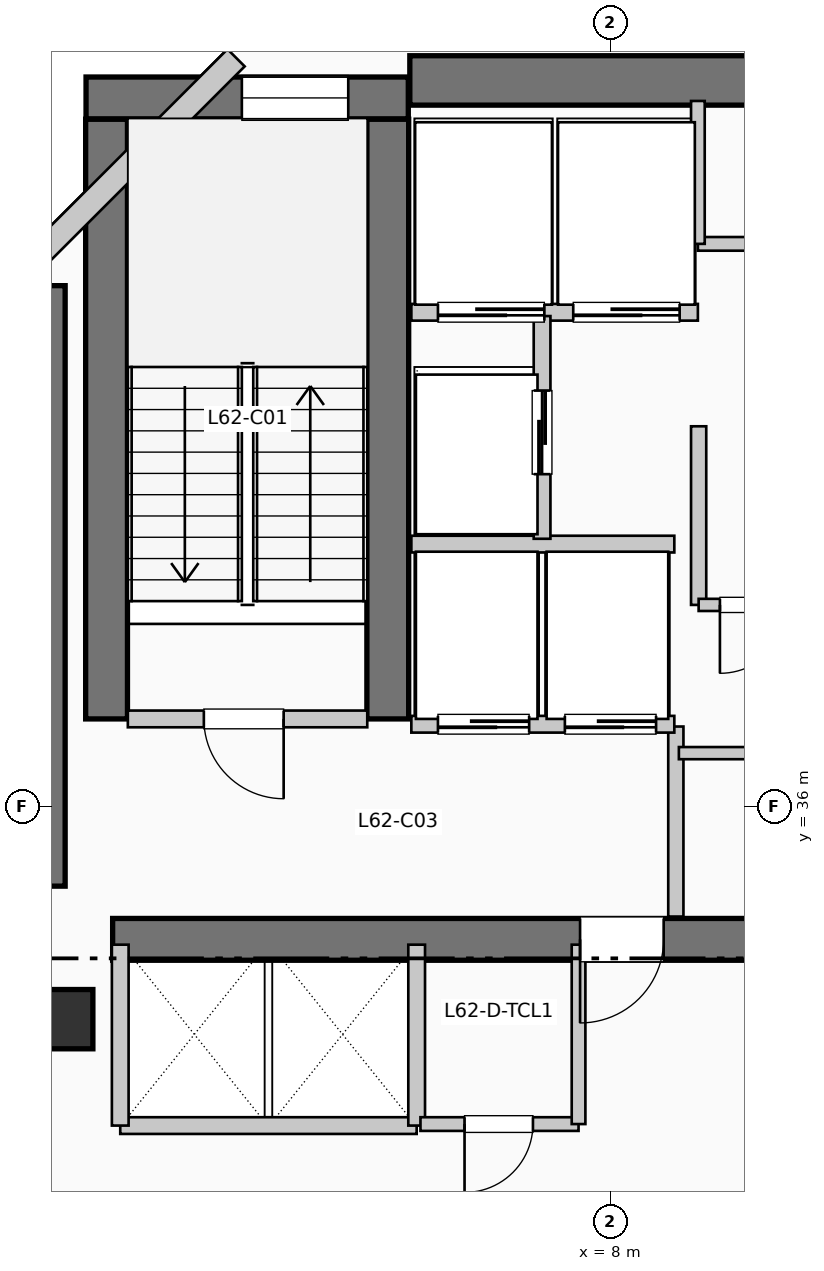
"""IFC4 building model, lengths in metres.
Left out: names, types, materials, properties, quantities, classifications, styles, units other than length and angle.
Written with IfcOpenShell. Run it as: python <this file> out.ifc"""

import sys

from ifc_helpers import new_model, si_unit, direction, frame, frame_2d, origin, origin_2d, place, context, subcontext, project, spatial, rectangle, extrude, element, fill, save


model = new_model("IFC4")
c1 = context("Model", 3, precision=1e-05, world=origin(), true_north=direction((0.0, 1.0)))
c2 = subcontext(c1, "Body", "Model", "MODEL_VIEW")
j1 = project(units=[si_unit("LENGTHUNIT", "METRE"), si_unit("PLANEANGLEUNIT", "RADIAN")], contexts=[c1])
p1 = place(None, origin())
s1 = spatial("IfcSite", under=j1, at=p1, CompositionType="ELEMENT")
p2 = place(p1, origin())
s2 = spatial("IfcBuilding", under=s1, at=p2, CompositionType="ELEMENT")
p3 = place(p2, frame((0.0, 0.0, 256.41)))
s3 = spatial("IfcBuildingStorey", under=s2, at=p3, CompositionType="ELEMENT", Elevation=256.41)
p4 = place(p3, frame((5.36, 45.55, 0.0), z_axis=(0.0, 0.0, 1.0), x_axis=(1.0, 0.0, 0.0)))
e1 = element("IfcWall", 1, at=p4, inside=s3, PredefinedType="SHEAR", context=c2, shape_type="SweptSolid", body=[
    extrude(rectangle(XDim=13.98, YDim=0.65, at=frame_2d((6.99, 0.0))), origin(), (0.0, 0.0, 1.0), 3.96),
])
p5 = place(p3, frame((0.5, 34.95, 0.0), z_axis=(0.0, 0.0, 1.0), x_axis=(0.0, 1.0, 0.0)))
e2 = element("IfcWall", 2, at=p5, inside=s3, PredefinedType="SHEAR", context=c2, shape_type="SweptSolid", body=[
    extrude(rectangle(XDim=7.9, YDim=0.65, at=frame_2d((3.95, 0.0))), origin(), (0.0, 0.0, 1.0), 3.96),
])
p6 = place(p3, frame((1.45, 34.25, 0.0), z_axis=(0.0, 0.0, 1.0), x_axis=(1.0, 0.0, 0.0)))
e3 = element("IfcWall", 3, at=p6, inside=s3, PredefinedType="SHEAR", context=c2, shape_type="SweptSolid", body=[
    extrude(rectangle(XDim=10.71, YDim=0.55, at=frame_2d((5.355, 0.0))), origin(), (0.0, 0.0, 1.0), 3.96),
])
p7 = place(p6, frame((7.25, 0.0, 0.0), z_axis=(0.0, 0.0, 1.0), x_axis=(-1.0, 0.0, 0.0)))
e4 = element("IfcOpeningElement", 4, at=p7, cuts=e3, PredefinedType="OPENING", context=c2, shape_type="SweptSolid", body=[
    extrude(rectangle(XDim=1.1, YDim=2.15, at=frame_2d((0.55, 1.075))), frame((0.0, 0.285, 0.0), z_axis=(0.0, -1.0, 0.0), x_axis=(1.0, 0.0, 0.0)), (0.0, 0.0, 1.0), 0.57),
])
for number, where, z_axis, x_axis in (
    (5, (1.37, 37.15, 0.0), (0.0, 0.0, 1.0), (0.0, 1.0, 0.0)),
    (6, (5.07, 37.15, 0.0), (0.0, 0.0, 1.0), (0.0, 1.0, 0.0)),
):
    element("IfcWall", number, at=place(p3, frame(where, z_axis=z_axis, x_axis=x_axis)), inside=s3, PredefinedType="SHEAR", context=c2, shape_type="SweptSolid", body=[
        extrude(rectangle(XDim=7.89, YDim=0.55, at=frame_2d((3.945, 0.0))), origin(), (0.0, 0.0, 1.0), 3.96),
    ])
p8 = place(p3, frame((1.1, 45.32, 0.0), z_axis=(0.0, 0.0, 1.0), x_axis=(1.0, 0.0, 0.0)))
e7 = element("IfcWall", 7, at=p8, inside=s3, PredefinedType="SHEAR", context=c2, shape_type="SweptSolid", body=[
    extrude(rectangle(XDim=4.24, YDim=0.55, at=frame_2d((2.12, 0.0))), origin(), (0.0, 0.0, 1.0), 3.96),
])
p9 = place(p8, frame((2.05, 0.0, 1.05)))
e8 = element("IfcOpeningElement", 8, at=p9, cuts=e7, PredefinedType="OPENING", context=c2, shape_type="SweptSolid", body=[
    extrude(rectangle(XDim=1.4, YDim=1.8, at=frame_2d((0.7, 0.9))), frame((0.0, 0.285, 0.0), z_axis=(0.0, -1.0, 0.0), x_axis=(1.0, 0.0, 0.0)), (0.0, 0.0, 1.0), 0.57),
])
p10 = place(p3, frame((0.8, 33.2, 0.0), z_axis=(0.0, 0.0, 1.0), x_axis=(1.0, 0.0, 0.0)))
e9 = element("IfcColumn", 9, at=p10, inside=s3, PredefinedType="COLUMN", context=c2, shape_type="SweptSolid", body=[
    extrude(rectangle(XDim=0.78, YDim=0.78, at=origin_2d()), origin(), (0.0, 0.0, 1.0), 3.96),
])
p11 = place(p3, frame((3.074, 45.848, 0.0), z_axis=(0.0, 0.0, 1.0), x_axis=(-0.707106781187, -0.707106781187, 0.0)))
e10 = element("IfcWall", 10, at=p11, inside=s3, PredefinedType="SOLIDWALL", context=c2, shape_type="SweptSolid", body=[
    extrude(rectangle(XDim=4.133, YDim=0.32, at=frame_2d((2.066, 0.0))), origin(), (0.0, 0.0, 1.0), 3.71),
])
p12 = place(p3, frame((1.65, 37.15, 0.0), z_axis=(0.0, 0.0, 1.0), x_axis=(1.0, 0.0, 0.0)))
e11 = element("IfcWall", 11, at=p12, inside=s3, PredefinedType="PARTITIONING", context=c2, shape_type="SweptSolid", body=[
    extrude(rectangle(XDim=3.15, YDim=0.22, at=frame_2d((1.575, 0.0))), origin(), (0.0, 0.0, 1.0), 3.71),
])
p13 = place(p12, frame((2.05, 0.0, 0.0), z_axis=(0.0, 0.0, 1.0), x_axis=(-1.0, 0.0, 0.0)))
e12 = element("IfcOpeningElement", 12, at=p13, cuts=e11, PredefinedType="OPENING", context=c2, shape_type="SweptSolid", body=[
    extrude(rectangle(XDim=1.05, YDim=2.15, at=frame_2d((0.525, 1.075))), frame((0.0, 0.12, 0.0), z_axis=(0.0, -1.0, 0.0), x_axis=(1.0, 0.0, 0.0)), (0.0, 0.0, 1.0), 0.24),
])
p14 = place(p3, frame((8.86, 34.55, 0.0), z_axis=(0.0, 0.0, 1.0), x_axis=(0.0, 1.0, 0.0)))
e13 = element("IfcWall", 13, at=p14, inside=s3, PredefinedType="PARTITIONING", context=c2, shape_type="SweptSolid", body=[
    extrude(rectangle(XDim=2.5, YDim=0.2, at=frame_2d((1.25, 0.0))), origin(), (0.0, 0.0, 1.0), 3.71),
])
p15 = place(p3, frame((5.38, 37.08, 0.0), z_axis=(0.0, 0.0, 1.0), x_axis=(1.0, 0.0, 0.0)))
e14 = element("IfcWall", 14, at=p15, inside=s3, PredefinedType="PARTITIONING", context=c2, shape_type="SweptSolid", body=[
    extrude(rectangle(XDim=3.46, YDim=0.22, at=frame_2d((1.73, 0.0))), origin(), (0.0, 0.0, 1.0), 3.71),
])
p16 = place(p15, frame((1.55, 0.0, 0.0), z_axis=(0.0, 0.0, 1.0), x_axis=(-1.0, 0.0, 0.0)))
e15 = element("IfcOpeningElement", 15, at=p16, cuts=e14, PredefinedType="OPENING", context=c2, shape_type="SweptSolid", body=[
    extrude(rectangle(XDim=1.2, YDim=2.2, at=frame_2d((0.6, 1.1))), frame((0.0, 0.12, 0.0), z_axis=(0.0, -1.0, 0.0), x_axis=(1.0, 0.0, 0.0)), (0.0, 0.0, 1.0), 0.24),
])
p17 = place(p15, frame((3.22, 0.0, 0.0), z_axis=(0.0, 0.0, 1.0), x_axis=(-1.0, 0.0, 0.0)))
e16 = element("IfcOpeningElement", 16, at=p17, cuts=e14, PredefinedType="OPENING", context=c2, shape_type="SweptSolid", body=[
    extrude(rectangle(XDim=1.2, YDim=2.2, at=frame_2d((0.6, 1.1))), frame((0.0, 0.12, 0.0), z_axis=(0.0, -1.0, 0.0), x_axis=(1.0, 0.0, 0.0)), (0.0, 0.0, 1.0), 0.24),
])
p18 = place(p3, frame((5.38, 39.45, 0.0), z_axis=(0.0, 0.0, 1.0), x_axis=(1.0, 0.0, 0.0)))
e17 = element("IfcWall", 17, at=p18, inside=s3, PredefinedType="PARTITIONING", context=c2, shape_type="SweptSolid", body=[
    extrude(rectangle(XDim=3.46, YDim=0.22, at=frame_2d((1.73, 0.0))), origin(), (0.0, 0.0, 1.0), 3.71),
])
p19 = place(p3, frame((5.38, 42.5, 0.0), z_axis=(0.0, 0.0, 1.0), x_axis=(1.0, 0.0, 0.0)))
e18 = element("IfcWall", 18, at=p19, inside=s3, PredefinedType="PARTITIONING", context=c2, shape_type="SweptSolid", body=[
    extrude(rectangle(XDim=3.77, YDim=0.22, at=frame_2d((1.885, 0.0))), origin(), (0.0, 0.0, 1.0), 3.71),
])
p20 = place(p19, frame((1.75, 0.0, 0.0), z_axis=(0.0, 0.0, 1.0), x_axis=(-1.0, 0.0, 0.0)))
e19 = element("IfcOpeningElement", 19, at=p20, cuts=e18, PredefinedType="OPENING", context=c2, shape_type="SweptSolid", body=[
    extrude(rectangle(XDim=1.4, YDim=2.2, at=frame_2d((0.7, 1.1))), frame((0.0, 0.12, 0.0), z_axis=(0.0, -1.0, 0.0), x_axis=(1.0, 0.0, 0.0)), (0.0, 0.0, 1.0), 0.24),
])
p21 = place(p19, frame((3.53, 0.0, 0.0), z_axis=(0.0, 0.0, 1.0), x_axis=(-1.0, 0.0, 0.0)))
e20 = element("IfcOpeningElement", 20, at=p21, cuts=e18, PredefinedType="OPENING", context=c2, shape_type="SweptSolid", body=[
    extrude(rectangle(XDim=1.4, YDim=2.2, at=frame_2d((0.7, 1.1))), frame((0.0, 0.12, 0.0), z_axis=(0.0, -1.0, 0.0), x_axis=(1.0, 0.0, 0.0)), (0.0, 0.0, 1.0), 0.24),
])
p22 = place(p3, frame((7.1, 39.52, 0.0), z_axis=(0.0, 0.0, 1.0), x_axis=(0.0, 1.0, 0.0)))
e21 = element("IfcWall", 21, at=p22, inside=s3, PredefinedType="PARTITIONING", context=c2, shape_type="SweptSolid", body=[
    extrude(rectangle(XDim=2.93, YDim=0.22, at=frame_2d((1.465, 0.0))), origin(), (0.0, 0.0, 1.0), 3.71),
])
p23 = place(p22, frame((0.85, 0.0, 0.0)))
e22 = element("IfcOpeningElement", 22, at=p23, cuts=e21, PredefinedType="OPENING", context=c2, shape_type="SweptSolid", body=[
    extrude(rectangle(XDim=1.1, YDim=2.2, at=frame_2d((0.55, 1.1))), frame((0.0, 0.12, 0.0), z_axis=(0.0, -1.0, 0.0), x_axis=(1.0, 0.0, 0.0)), (0.0, 0.0, 1.0), 0.24),
])
p24 = place(p3, frame((1.55, 31.8, 0.0), z_axis=(0.0, 0.0, 1.0), x_axis=(1.0, 0.0, 0.0)))
e23 = element("IfcWall", 23, at=p24, inside=s3, PredefinedType="PARTITIONING", context=c2, shape_type="SweptSolid", body=[
    extrude(rectangle(XDim=3.9, YDim=0.22, at=frame_2d((1.95, 0.0))), origin(), (0.0, 0.0, 1.0), 3.71),
])
for number, where, z_axis, x_axis in (
    (24, (1.55, 31.8, 0.0), (0.0, 0.0, 1.0), (0.0, 1.0, 0.0)),
    (25, (5.45, 31.8, 0.0), (0.0, 0.0, 1.0), (0.0, 1.0, 0.0)),
):
    element("IfcWall", number, at=place(p3, frame(where, z_axis=z_axis, x_axis=x_axis)), inside=s3, PredefinedType="PARTITIONING", context=c2, shape_type="SweptSolid", body=[
        extrude(rectangle(XDim=2.38, YDim=0.22, at=frame_2d((1.19, 0.0))), origin(), (0.0, 0.0, 1.0), 3.71),
    ])
p25 = place(p3, frame((9.16, 38.65, 0.0), z_axis=(0.0, 0.0, 1.0), x_axis=(0.0, 1.0, 0.0)))
e26 = element("IfcWall", 26, at=p25, inside=s3, PredefinedType="PARTITIONING", context=c2, shape_type="SweptSolid", body=[
    extrude(rectangle(XDim=2.35, YDim=0.2, at=frame_2d((1.175, 0.0))), origin(), (0.0, 0.0, 1.0), 3.71),
])
p26 = place(p3, frame((5.5, 31.82, 0.0), z_axis=(0.0, 0.0, 1.0), x_axis=(1.0, 0.0, 0.0)))
e27 = element("IfcWall", 27, at=p26, inside=s3, PredefinedType="PLUMBINGWALL", context=c2, shape_type="SweptSolid", body=[
    extrude(rectangle(XDim=2.08, YDim=0.18, at=frame_2d((1.04, 0.0))), origin(), (0.0, 0.0, 1.0), 3.71),
])
p27 = place(p26, frame((1.48, 0.0, 0.0), z_axis=(0.0, 0.0, 1.0), x_axis=(-1.0, 0.0, 0.0)))
e28 = element("IfcOpeningElement", 28, at=p27, cuts=e27, PredefinedType="OPENING", context=c2, shape_type="SweptSolid", body=[
    extrude(rectangle(XDim=0.9, YDim=2.1, at=frame_2d((0.45, 1.05))), frame((0.0, 0.1, 0.0), z_axis=(0.0, -1.0, 0.0), x_axis=(1.0, 0.0, 0.0)), (0.0, 0.0, 1.0), 0.2),
])
p28 = place(p3, frame((7.58, 31.82, 0.0), z_axis=(0.0, 0.0, 1.0), x_axis=(0.0, 1.0, 0.0)))
e29 = element("IfcWall", 29, at=p28, inside=s3, PredefinedType="PLUMBINGWALL", context=c2, shape_type="SweptSolid", body=[
    extrude(rectangle(XDim=2.36, YDim=0.18, at=frame_2d((1.18, 0.0))), origin(), (0.0, 0.0, 1.0), 3.71),
])
p29 = place(p3, frame((8.9, 36.7, 0.0), z_axis=(0.0, 0.0, 1.0), x_axis=(1.0, 0.0, 0.0)))
e30 = element("IfcWall", 30, at=p29, inside=s3, PredefinedType="PARTITIONING", context=c2, shape_type="SweptSolid", body=[
    extrude(rectangle(XDim=3.25, YDim=0.16, at=frame_2d((1.625, 0.0))), origin(), (0.0, 0.0, 1.0), 3.71),
])
p30 = place(p29, frame((1.1, 0.0, 0.0)))
e31 = element("IfcOpeningElement", 31, at=p30, cuts=e30, PredefinedType="OPENING", context=c2, shape_type="SweptSolid", body=[
    extrude(rectangle(XDim=0.95, YDim=2.15, at=frame_2d((0.475, 1.075))), frame((0.0, 0.09, 0.0), z_axis=(0.0, -1.0, 0.0), x_axis=(1.0, 0.0, 0.0)), (0.0, 0.0, 1.0), 0.18),
])
p31 = place(p3, frame((9.16, 38.65, 0.0), z_axis=(0.0, 0.0, 1.0), x_axis=(1.0, 0.0, 0.0)))
e32 = element("IfcWall", 32, at=p31, inside=s3, PredefinedType="PARTITIONING", context=c2, shape_type="SweptSolid", body=[
    extrude(rectangle(XDim=3.42, YDim=0.16, at=frame_2d((1.71, 0.0))), origin(), (0.0, 0.0, 1.0), 3.71),
])
p32 = place(p31, frame((1.18, 0.0, 0.0), z_axis=(0.0, 0.0, 1.0), x_axis=(-1.0, 0.0, 0.0)))
e33 = element("IfcOpeningElement", 33, at=p32, cuts=e32, PredefinedType="OPENING", context=c2, shape_type="SweptSolid", body=[
    extrude(rectangle(XDim=0.9, YDim=2.15, at=frame_2d((0.45, 1.075))), frame((0.0, 0.09, 0.0), z_axis=(0.0, -1.0, 0.0), x_axis=(1.0, 0.0, 0.0)), (0.0, 0.0, 1.0), 0.18),
])
p33 = place(p31, frame((2.6, 0.0, 0.0), z_axis=(0.0, 0.0, 1.0), x_axis=(-1.0, 0.0, 0.0)))
e34 = element("IfcOpeningElement", 34, at=p33, cuts=e32, PredefinedType="OPENING", context=c2, shape_type="SweptSolid", body=[
    extrude(rectangle(XDim=0.9, YDim=2.15, at=frame_2d((0.45, 1.075))), frame((0.0, 0.09, 0.0), z_axis=(0.0, -1.0, 0.0), x_axis=(1.0, 0.0, 0.0)), (0.0, 0.0, 1.0), 0.18),
])
p34 = place(p3, frame((9.15, 43.4, 0.0), z_axis=(0.0, 0.0, 1.0), x_axis=(1.0, 0.0, 0.0)))
e35 = element("IfcWall", 35, at=p34, inside=s3, PredefinedType="PLUMBINGWALL", context=c2, shape_type="SweptSolid", body=[
    extrude(rectangle(XDim=9.33, YDim=0.18, at=frame_2d((4.665, 0.0))), origin(), (0.0, 0.0, 1.0), 3.71),
])
p35 = place(p34, frame((0.72, 0.0, 0.0)))
e36 = element("IfcOpeningElement", 36, at=p35, cuts=e35, PredefinedType="OPENING", context=c2, shape_type="SweptSolid", body=[
    extrude(rectangle(XDim=0.92, YDim=2.1, at=frame_2d((0.46, 1.05))), frame((0.0, 0.1, 0.0), z_axis=(0.0, -1.0, 0.0), x_axis=(1.0, 0.0, 0.0)), (0.0, 0.0, 1.0), 0.2),
])
p36 = place(p34, frame((3.02, 0.0, 0.0)))
e37 = element("IfcOpeningElement", 37, at=p36, cuts=e35, PredefinedType="OPENING", context=c2, shape_type="SweptSolid", body=[
    extrude(rectangle(XDim=0.92, YDim=2.1, at=frame_2d((0.46, 1.05))), frame((0.0, 0.1, 0.0), z_axis=(0.0, -1.0, 0.0), x_axis=(1.0, 0.0, 0.0)), (0.0, 0.0, 1.0), 0.2),
])
p37 = place(p34, frame((5.34, 0.0, 0.0)))
e38 = element("IfcOpeningElement", 38, at=p37, cuts=e35, PredefinedType="OPENING", context=c2, shape_type="SweptSolid", body=[
    extrude(rectangle(XDim=0.92, YDim=2.1, at=frame_2d((0.46, 1.05))), frame((0.0, 0.1, 0.0), z_axis=(0.0, -1.0, 0.0), x_axis=(1.0, 0.0, 0.0)), (0.0, 0.0, 1.0), 0.2),
])
p38 = place(p34, frame((7.66, 0.0, 0.0)))
e39 = element("IfcOpeningElement", 39, at=p38, cuts=e35, PredefinedType="OPENING", context=c2, shape_type="SweptSolid", body=[
    extrude(rectangle(XDim=0.95, YDim=2.1, at=frame_2d((0.475, 1.05))), frame((0.0, 0.1, 0.0), z_axis=(0.0, -1.0, 0.0), x_axis=(1.0, 0.0, 0.0)), (0.0, 0.0, 1.0), 0.2),
])
p39 = place(p3, frame((9.15, 43.4, 0.0), z_axis=(0.0, 0.0, 1.0), x_axis=(0.0, 1.0, 0.0)))
e40 = element("IfcWall", 40, at=p39, inside=s3, PredefinedType="PLUMBINGWALL", context=c2, shape_type="SweptSolid", body=[
    extrude(rectangle(XDim=1.88, YDim=0.18, at=frame_2d((0.94, 0.0))), origin(), (0.0, 0.0, 1.0), 3.71),
])
p40 = place(p9, origin())
e41 = element("IfcWindow", 41, at=p40, inside=s3, PartitioningType="SINGLE_PANEL", PredefinedType="WINDOW", context=c2, shape_type="SweptSolid", body=[
    extrude(rectangle(XDim=1.4, YDim=1.8, at=frame_2d((0.7, 0.9))), frame((0.0, 0.03, 0.0), z_axis=(0.0, -1.0, 0.0), x_axis=(1.0, 0.0, 0.0)), (0.0, 0.0, 1.0), 0.06),
])
fill(e8, e41)
p41 = place(p13, origin())
e42 = element("IfcDoor", 42, at=p41, inside=s3, OperationType="SINGLE_SWING_RIGHT", PredefinedType="DOOR", context=c2, shape_type="SweptSolid", body=[
    extrude(rectangle(XDim=1.05, YDim=2.15, at=frame_2d((0.525, 1.075))), frame((0.0, 0.025, 0.0), z_axis=(0.0, -1.0, 0.0), x_axis=(1.0, 0.0, 0.0)), (0.0, 0.0, 1.0), 0.05),
])
fill(e12, e42)
p42 = place(p7, origin())
e43 = element("IfcDoor", 43, at=p42, inside=s3, OperationType="SINGLE_SWING_LEFT", PredefinedType="DOOR", context=c2, shape_type="SweptSolid", body=[
    extrude(rectangle(XDim=1.1, YDim=2.15, at=frame_2d((0.55, 1.075))), frame((0.0, 0.025, 0.0), z_axis=(0.0, -1.0, 0.0), x_axis=(1.0, 0.0, 0.0)), (0.0, 0.0, 1.0), 0.05),
])
fill(e4, e43)
p43 = place(p16, origin())
e44 = element("IfcDoor", 44, at=p43, inside=s3, OperationType="SLIDING_TO_RIGHT", PredefinedType="DOOR", context=c2, shape_type="SweptSolid", body=[
    extrude(rectangle(XDim=1.2, YDim=2.2, at=frame_2d((0.6, 1.1))), frame((0.0, 0.025, 0.0), z_axis=(0.0, -1.0, 0.0), x_axis=(1.0, 0.0, 0.0)), (0.0, 0.0, 1.0), 0.05),
])
fill(e15, e44)
p44 = place(p17, origin())
e45 = element("IfcDoor", 45, at=p44, inside=s3, OperationType="SLIDING_TO_RIGHT", PredefinedType="DOOR", context=c2, shape_type="SweptSolid", body=[
    extrude(rectangle(XDim=1.2, YDim=2.2, at=frame_2d((0.6, 1.1))), frame((0.0, 0.025, 0.0), z_axis=(0.0, -1.0, 0.0), x_axis=(1.0, 0.0, 0.0)), (0.0, 0.0, 1.0), 0.05),
])
fill(e16, e45)
p45 = place(p20, origin())
e46 = element("IfcDoor", 46, at=p45, inside=s3, OperationType="SLIDING_TO_LEFT", PredefinedType="DOOR", context=c2, shape_type="SweptSolid", body=[
    extrude(rectangle(XDim=1.4, YDim=2.2, at=frame_2d((0.7, 1.1))), frame((0.0, 0.025, 0.0), z_axis=(0.0, -1.0, 0.0), x_axis=(1.0, 0.0, 0.0)), (0.0, 0.0, 1.0), 0.05),
])
fill(e19, e46)
p46 = place(p21, origin())
e47 = element("IfcDoor", 47, at=p46, inside=s3, OperationType="SLIDING_TO_LEFT", PredefinedType="DOOR", context=c2, shape_type="SweptSolid", body=[
    extrude(rectangle(XDim=1.4, YDim=2.2, at=frame_2d((0.7, 1.1))), frame((0.0, 0.025, 0.0), z_axis=(0.0, -1.0, 0.0), x_axis=(1.0, 0.0, 0.0)), (0.0, 0.0, 1.0), 0.05),
])
fill(e20, e47)
p47 = place(p23, origin())
e48 = element("IfcDoor", 48, at=p47, inside=s3, OperationType="SLIDING_TO_LEFT", PredefinedType="DOOR", context=c2, shape_type="SweptSolid", body=[
    extrude(rectangle(XDim=1.1, YDim=2.2, at=frame_2d((0.55, 1.1))), frame((0.0, 0.025, 0.0), z_axis=(0.0, -1.0, 0.0), x_axis=(1.0, 0.0, 0.0)), (0.0, 0.0, 1.0), 0.05),
])
fill(e22, e48)
p48 = place(p27, origin())
e49 = element("IfcDoor", 49, at=p48, inside=s3, OperationType="SINGLE_SWING_LEFT", PredefinedType="DOOR", context=c2, shape_type="SweptSolid", body=[
    extrude(rectangle(XDim=0.9, YDim=2.1, at=frame_2d((0.45, 1.05))), frame((0.0, 0.025, 0.0), z_axis=(0.0, -1.0, 0.0), x_axis=(1.0, 0.0, 0.0)), (0.0, 0.0, 1.0), 0.05),
])
fill(e28, e49)
p49 = place(p32, origin())
e50 = element("IfcDoor", 50, at=p49, inside=s3, OperationType="SINGLE_SWING_LEFT", PredefinedType="DOOR", context=c2, shape_type="SweptSolid", body=[
    extrude(rectangle(XDim=0.9, YDim=2.15, at=frame_2d((0.45, 1.075))), frame((0.0, 0.025, 0.0), z_axis=(0.0, -1.0, 0.0), x_axis=(1.0, 0.0, 0.0)), (0.0, 0.0, 1.0), 0.05),
])
fill(e33, e50)
save(model, sys.argv[1])
